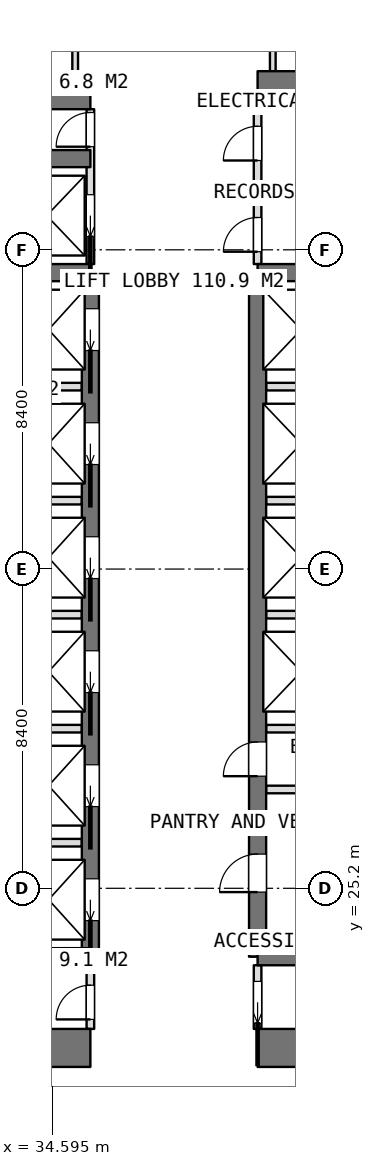
"""IFC4 building model, lengths in metres.
Left out: names, types, materials, properties, quantities, classifications, styles, units other than length and angle.
Written with IfcOpenShell. Run it as: python <this file> out.ifc"""

import sys

from ifc_helpers import new_model, si_unit, direction, frame, frame_2d, origin, place, context, subcontext, project, spatial, rectangle, extrude, element, fill, save


model = new_model("IFC4")
c1 = context("Model", 3, precision=1e-05, world=origin(), true_north=direction((0.0, 1.0)))
c2 = subcontext(c1, "Body", "Model", "MODEL_VIEW")
j1 = project(units=[si_unit("LENGTHUNIT", "METRE"), si_unit("PLANEANGLEUNIT", "RADIAN")], contexts=[c1])
p1 = place(None, origin())
s1 = spatial("IfcSite", under=j1, at=p1, CompositionType="ELEMENT")
p2 = place(p1, origin())
s2 = spatial("IfcBuilding", under=s1, at=p2, CompositionType="ELEMENT")
p3 = place(p2, frame((0.0, 0.0, 110.3)))
s3 = spatial("IfcBuildingStorey", under=s2, at=p3, CompositionType="ELEMENT", Elevation=110.3)
p4 = place(p3, frame((25.2, 21.0, 0.0), z_axis=(0.0, 0.0, 1.0), x_axis=(1.0, 0.0, 0.0)))
e1 = element("IfcWall", 1, at=p4, inside=s3, PredefinedType="SHEAR", context=c2, shape_type="SweptSolid", body=[
    extrude(rectangle(XDim=10.4, YDim=1.0, at=frame_2d((5.2, 0.0))), origin(), (0.0, 0.0, 1.0), 3.75),
])
p5 = place(p3, frame((40.0, 21.0, 0.0), z_axis=(0.0, 0.0, 1.0), x_axis=(1.0, 0.0, 0.0)))
e2 = element("IfcWall", 2, at=p5, inside=s3, PredefinedType="SHEAR", context=c2, shape_type="SweptSolid", body=[
    extrude(rectangle(XDim=10.4, YDim=1.0, at=frame_2d((5.2, 0.0))), origin(), (0.0, 0.0, 1.0), 3.75),
])
p6 = place(p3, frame((25.2, 46.2, 0.0), z_axis=(0.0, 0.0, 1.0), x_axis=(1.0, 0.0, 0.0)))
e3 = element("IfcWall", 3, at=p6, inside=s3, PredefinedType="SHEAR", context=c2, shape_type="SweptSolid", body=[
    extrude(rectangle(XDim=10.4, YDim=1.0, at=frame_2d((5.2, 0.0))), origin(), (0.0, 0.0, 1.0), 3.75),
])
p7 = place(p3, frame((40.0, 46.2, 0.0), z_axis=(0.0, 0.0, 1.0), x_axis=(1.0, 0.0, 0.0)))
e4 = element("IfcWall", 4, at=p7, inside=s3, PredefinedType="SHEAR", context=c2, shape_type="SweptSolid", body=[
    extrude(rectangle(XDim=10.4, YDim=1.0, at=frame_2d((5.2, 0.0))), origin(), (0.0, 0.0, 1.0), 3.75),
])
p8 = place(p3, frame((35.6, 23.4, 0.0), z_axis=(0.0, 0.0, 1.0), x_axis=(0.0, 1.0, 0.0)))
e5 = element("IfcWall", 5, at=p8, inside=s3, PredefinedType="SHEAR", context=c2, shape_type="SweptSolid", body=[
    extrude(rectangle(XDim=18.0, YDim=0.45, at=frame_2d((9.0, 0.0))), origin(), (0.0, 0.0, 1.0), 3.75),
])
p9 = place(p8, frame((0.95, 0.0, 0.0)))
e6 = element("IfcOpeningElement", 6, at=p9, cuts=e5, PredefinedType="OPENING", context=c2, shape_type="SweptSolid", body=[
    extrude(rectangle(XDim=1.1, YDim=2.1, at=frame_2d((0.55, 1.05))), frame((0.0, 0.235, 0.0), z_axis=(0.0, -1.0, 0.0), x_axis=(1.0, 0.0, 0.0)), (0.0, 0.0, 1.0), 0.47),
])
p10 = place(p8, frame((3.95, 0.0, 0.0)))
e7 = element("IfcOpeningElement", 7, at=p10, cuts=e5, PredefinedType="OPENING", context=c2, shape_type="SweptSolid", body=[
    extrude(rectangle(XDim=1.1, YDim=2.1, at=frame_2d((0.55, 1.05))), frame((0.0, 0.235, 0.0), z_axis=(0.0, -1.0, 0.0), x_axis=(1.0, 0.0, 0.0)), (0.0, 0.0, 1.0), 0.47),
])
p11 = place(p8, frame((6.95, 0.0, 0.0)))
e8 = element("IfcOpeningElement", 8, at=p11, cuts=e5, PredefinedType="OPENING", context=c2, shape_type="SweptSolid", body=[
    extrude(rectangle(XDim=1.1, YDim=2.1, at=frame_2d((0.55, 1.05))), frame((0.0, 0.235, 0.0), z_axis=(0.0, -1.0, 0.0), x_axis=(1.0, 0.0, 0.0)), (0.0, 0.0, 1.0), 0.47),
])
p12 = place(p8, frame((9.95, 0.0, 0.0)))
e9 = element("IfcOpeningElement", 9, at=p12, cuts=e5, PredefinedType="OPENING", context=c2, shape_type="SweptSolid", body=[
    extrude(rectangle(XDim=1.1, YDim=2.1, at=frame_2d((0.55, 1.05))), frame((0.0, 0.235, 0.0), z_axis=(0.0, -1.0, 0.0), x_axis=(1.0, 0.0, 0.0)), (0.0, 0.0, 1.0), 0.47),
])
p13 = place(p8, frame((12.95, 0.0, 0.0)))
e10 = element("IfcOpeningElement", 10, at=p13, cuts=e5, PredefinedType="OPENING", context=c2, shape_type="SweptSolid", body=[
    extrude(rectangle(XDim=1.1, YDim=2.1, at=frame_2d((0.55, 1.05))), frame((0.0, 0.235, 0.0), z_axis=(0.0, -1.0, 0.0), x_axis=(1.0, 0.0, 0.0)), (0.0, 0.0, 1.0), 0.47),
])
p14 = place(p8, frame((15.95, 0.0, 0.0)))
e11 = element("IfcOpeningElement", 11, at=p14, cuts=e5, PredefinedType="OPENING", context=c2, shape_type="SweptSolid", body=[
    extrude(rectangle(XDim=1.1, YDim=2.1, at=frame_2d((0.55, 1.05))), frame((0.0, 0.235, 0.0), z_axis=(0.0, -1.0, 0.0), x_axis=(1.0, 0.0, 0.0)), (0.0, 0.0, 1.0), 0.47),
])
p15 = place(p3, frame((40.0, 23.4, 0.0), z_axis=(0.0, 0.0, 1.0), x_axis=(0.0, 1.0, 0.0)))
e12 = element("IfcWall", 12, at=p15, inside=s3, PredefinedType="SHEAR", context=c2, shape_type="SweptSolid", body=[
    extrude(rectangle(XDim=18.0, YDim=0.45, at=frame_2d((9.0, 0.0))), origin(), (0.0, 0.0, 1.0), 3.75),
])
p16 = place(p15, frame((1.7, 0.0, 0.0)))
e13 = element("IfcOpeningElement", 13, at=p16, cuts=e12, PredefinedType="OPENING", context=c2, shape_type="SweptSolid", body=[
    extrude(rectangle(XDim=1.0, YDim=2.1, at=frame_2d((0.5, 1.05))), frame((0.0, 0.235, 0.0), z_axis=(0.0, -1.0, 0.0), x_axis=(1.0, 0.0, 0.0)), (0.0, 0.0, 1.0), 0.47),
])
p17 = place(p15, frame((4.75, 0.0, 0.0)))
e14 = element("IfcOpeningElement", 14, at=p17, cuts=e12, PredefinedType="OPENING", context=c2, shape_type="SweptSolid", body=[
    extrude(rectangle(XDim=0.9, YDim=2.1, at=frame_2d((0.45, 1.05))), frame((0.0, 0.235, 0.0), z_axis=(0.0, -1.0, 0.0), x_axis=(1.0, 0.0, 0.0)), (0.0, 0.0, 1.0), 0.47),
])
for number, where, z_axis, x_axis in (
    (15, (31.8, 23.4, 0.0), (0.0, 0.0, 1.0), (1.0, 0.0, 0.0)),
    (16, (31.8, 41.4, 0.0), (0.0, 0.0, 1.0), (1.0, 0.0, 0.0)),
    (17, (31.8, 44.4, 0.0), (0.0, 0.0, 1.0), (1.0, 0.0, 0.0)),
    (18, (40.0, 23.4, 0.0), (0.0, 0.0, 1.0), (1.0, 0.0, 0.0)),
    (19, (40.0, 41.4, 0.0), (0.0, 0.0, 1.0), (1.0, 0.0, 0.0)),
):
    element("IfcWall", number, at=place(p3, frame(where, z_axis=z_axis, x_axis=x_axis)), inside=s3, PredefinedType="SHEAR", context=c2, shape_type="SweptSolid", body=[
        extrude(rectangle(XDim=3.8, YDim=0.45, at=frame_2d((1.9, 0.0))), origin(), (0.0, 0.0, 1.0), 3.75),
    ])
for number, where, z_axis, x_axis in (
    (20, (32.025, 26.4, 0.0), (0.0, 0.0, 1.0), (1.0, 0.0, 0.0)),
    (21, (32.025, 29.4, 0.0), (0.0, 0.0, 1.0), (1.0, 0.0, 0.0)),
    (22, (32.025, 32.4, 0.0), (0.0, 0.0, 1.0), (1.0, 0.0, 0.0)),
    (23, (32.025, 35.4, 0.0), (0.0, 0.0, 1.0), (1.0, 0.0, 0.0)),
    (24, (32.025, 38.4, 0.0), (0.0, 0.0, 1.0), (1.0, 0.0, 0.0)),
):
    element("IfcWall", number, at=place(p3, frame(where, z_axis=z_axis, x_axis=x_axis)), inside=s3, PredefinedType="PARTITIONING", context=c2, shape_type="SweptSolid", body=[
        extrude(rectangle(XDim=3.35, YDim=0.2, at=frame_2d((1.675, 0.0))), origin(), (0.0, 0.0, 1.0), 3.5),
    ])
for number, where, z_axis, x_axis in (
    (25, (40.225, 29.4, 0.0), (0.0, 0.0, 1.0), (1.0, 0.0, 0.0)),
    (26, (40.225, 32.4, 0.0), (0.0, 0.0, 1.0), (1.0, 0.0, 0.0)),
    (27, (40.225, 35.4, 0.0), (0.0, 0.0, 1.0), (1.0, 0.0, 0.0)),
    (28, (40.225, 38.4, 0.0), (0.0, 0.0, 1.0), (1.0, 0.0, 0.0)),
):
    element("IfcWall", number, at=place(p3, frame(where, z_axis=z_axis, x_axis=x_axis)), inside=s3, PredefinedType="PARTITIONING", context=c2, shape_type="SweptSolid", body=[
        extrude(rectangle(XDim=3.35, YDim=0.2, at=frame_2d((1.675, 0.0))), origin(), (0.0, 0.0, 1.0), 3.5),
    ])
p18 = place(p3, frame((40.0, 21.5, 0.0), z_axis=(0.0, 0.0, 1.0), x_axis=(0.0, 1.0, 0.0)))
e29 = element("IfcWall", 29, at=p18, inside=s3, PredefinedType="PARTITIONING", context=c2, shape_type="SweptSolid", body=[
    extrude(rectangle(XDim=1.675, YDim=0.2, at=frame_2d((0.837, 0.0))), origin(), (0.0, 0.0, 1.0), 3.5),
])
p19 = place(p18, frame((0.15, 0.0, 0.0)))
e30 = element("IfcOpeningElement", 30, at=p19, cuts=e29, PredefinedType="OPENING", context=c2, shape_type="SweptSolid", body=[
    extrude(rectangle(XDim=1.1, YDim=2.1, at=frame_2d((0.55, 1.05))), frame((0.0, 0.11, 0.0), z_axis=(0.0, -1.0, 0.0), x_axis=(1.0, 0.0, 0.0)), (0.0, 0.0, 1.0), 0.22),
])
p20 = place(p3, frame((40.0, 41.625, 0.0), z_axis=(0.0, 0.0, 1.0), x_axis=(0.0, 1.0, 0.0)))
e31 = element("IfcWall", 31, at=p20, inside=s3, PredefinedType="PARTITIONING", context=c2, shape_type="SweptSolid", body=[
    extrude(rectangle(XDim=4.075, YDim=0.2, at=frame_2d((2.038, 0.0))), origin(), (0.0, 0.0, 1.0), 3.5),
])
p21 = place(p20, frame((2.725, 0.0, 0.0)))
e32 = element("IfcOpeningElement", 32, at=p21, cuts=e31, PredefinedType="OPENING", context=c2, shape_type="SweptSolid", body=[
    extrude(rectangle(XDim=0.9, YDim=2.1, at=frame_2d((0.45, 1.05))), frame((0.0, 0.11, 0.0), z_axis=(0.0, -1.0, 0.0), x_axis=(1.0, 0.0, 0.0)), (0.0, 0.0, 1.0), 0.22),
])
p22 = place(p20, frame((0.325, 0.0, 0.0)))
e33 = element("IfcOpeningElement", 33, at=p22, cuts=e31, PredefinedType="OPENING", context=c2, shape_type="SweptSolid", body=[
    extrude(rectangle(XDim=0.9, YDim=2.1, at=frame_2d((0.45, 1.05))), frame((0.0, 0.11, 0.0), z_axis=(0.0, -1.0, 0.0), x_axis=(1.0, 0.0, 0.0)), (0.0, 0.0, 1.0), 0.22),
])
p23 = place(p3, frame((35.6, 41.625, 0.0), z_axis=(0.0, 0.0, 1.0), x_axis=(0.0, 1.0, 0.0)))
e34 = element("IfcWall", 34, at=p23, inside=s3, PredefinedType="PARTITIONING", context=c2, shape_type="SweptSolid", body=[
    extrude(rectangle(XDim=4.075, YDim=0.2, at=frame_2d((2.038, 0.0))), origin(), (0.0, 0.0, 1.0), 3.5),
])
p24 = place(p23, frame((3.088, 0.0, 0.0)))
e35 = element("IfcOpeningElement", 35, at=p24, cuts=e34, PredefinedType="OPENING", context=c2, shape_type="SweptSolid", body=[
    extrude(rectangle(XDim=0.9, YDim=2.1, at=frame_2d((0.45, 1.05))), frame((0.0, 0.11, 0.0), z_axis=(0.0, -1.0, 0.0), x_axis=(1.0, 0.0, 0.0)), (0.0, 0.0, 1.0), 0.22),
])
p25 = place(p23, frame((0.725, 0.0, 0.0)))
e36 = element("IfcOpeningElement", 36, at=p25, cuts=e34, PredefinedType="OPENING", context=c2, shape_type="SweptSolid", body=[
    extrude(rectangle(XDim=1.1, YDim=2.1, at=frame_2d((0.55, 1.05))), frame((0.0, 0.11, 0.0), z_axis=(0.0, -1.0, 0.0), x_axis=(1.0, 0.0, 0.0)), (0.0, 0.0, 1.0), 0.22),
])
p26 = place(p3, frame((35.6, 21.5, 0.0), z_axis=(0.0, 0.0, 1.0), x_axis=(0.0, 1.0, 0.0)))
e37 = element("IfcWall", 37, at=p26, inside=s3, PredefinedType="PARTITIONING", context=c2, shape_type="SweptSolid", body=[
    extrude(rectangle(XDim=1.675, YDim=0.2, at=frame_2d((0.837, 0.0))), origin(), (0.0, 0.0, 1.0), 3.5),
])
p27 = place(p26, frame((0.25, 0.0, 0.0)))
e38 = element("IfcOpeningElement", 38, at=p27, cuts=e37, PredefinedType="OPENING", context=c2, shape_type="SweptSolid", body=[
    extrude(rectangle(XDim=0.9, YDim=2.1, at=frame_2d((0.45, 1.05))), frame((0.0, 0.11, 0.0), z_axis=(0.0, -1.0, 0.0), x_axis=(1.0, 0.0, 0.0)), (0.0, 0.0, 1.0), 0.22),
])
p28 = place(p3, frame((40.225, 27.8, 0.0), z_axis=(0.0, 0.0, 1.0), x_axis=(1.0, 0.0, 0.0)))
e39 = element("IfcWall", 39, at=p28, inside=s3, PredefinedType="PARTITIONING", context=c2, shape_type="SweptSolid", body=[
    extrude(rectangle(XDim=3.35, YDim=0.2, at=frame_2d((1.675, 0.0))), origin(), (0.0, 0.0, 1.0), 3.5),
])
p29 = place(p3, frame((40.0, 43.4, 0.0), z_axis=(0.0, 0.0, 1.0), x_axis=(1.0, 0.0, 0.0)))
e40 = element("IfcWall", 40, at=p29, inside=s3, PredefinedType="PARTITIONING", context=c2, shape_type="SweptSolid", body=[
    extrude(rectangle(XDim=3.575, YDim=0.2, at=frame_2d((1.788, 0.0))), origin(), (0.0, 0.0, 1.0), 3.5),
])
for number, where, z_axis, x_axis in (
    (41, (40.4, 46.7, 0.0), (0.0, 0.0, 1.0), (0.0, 1.0, 0.0)),
    (42, (35.2, 46.7, 0.0), (0.0, 0.0, 1.0), (0.0, 1.0, 0.0)),
):
    element("IfcWall", number, at=place(p3, frame(where, z_axis=z_axis, x_axis=x_axis)), inside=s3, PredefinedType="PARTITIONING", context=c2, shape_type="SweptSolid", body=[
        extrude(rectangle(XDim=2.625, YDim=0.15, at=frame_2d((1.312, 0.0))), origin(), (0.0, 0.0, 1.0), 3.5),
    ])
p30 = place(p19, origin())
e43 = element("IfcDoor", 43, at=p30, inside=s3, OperationType="SLIDING_TO_LEFT", PredefinedType="DOOR", context=c2, shape_type="SweptSolid", body=[
    extrude(rectangle(XDim=1.1, YDim=2.1, at=frame_2d((0.55, 1.05))), frame((0.0, 0.025, 0.0), z_axis=(0.0, -1.0, 0.0), x_axis=(1.0, 0.0, 0.0)), (0.0, 0.0, 1.0), 0.05),
])
fill(e30, e43)
p31 = place(p27, origin())
e44 = element("IfcDoor", 44, at=p31, inside=s3, OperationType="SINGLE_SWING_LEFT", PredefinedType="DOOR", context=c2, shape_type="SweptSolid", body=[
    extrude(rectangle(XDim=0.9, YDim=2.1, at=frame_2d((0.45, 1.05))), frame((0.0, 0.025, 0.0), z_axis=(0.0, -1.0, 0.0), x_axis=(1.0, 0.0, 0.0)), (0.0, 0.0, 1.0), 0.05),
])
fill(e38, e44)
p32 = place(p21, origin())
e45 = element("IfcDoor", 45, at=p32, inside=s3, OperationType="SINGLE_SWING_LEFT", PredefinedType="DOOR", context=c2, shape_type="SweptSolid", body=[
    extrude(rectangle(XDim=0.9, YDim=2.1, at=frame_2d((0.45, 1.05))), frame((0.0, 0.025, 0.0), z_axis=(0.0, -1.0, 0.0), x_axis=(1.0, 0.0, 0.0)), (0.0, 0.0, 1.0), 0.05),
])
fill(e32, e45)
p33 = place(p22, origin())
e46 = element("IfcDoor", 46, at=p33, inside=s3, OperationType="SINGLE_SWING_LEFT", PredefinedType="DOOR", context=c2, shape_type="SweptSolid", body=[
    extrude(rectangle(XDim=0.9, YDim=2.1, at=frame_2d((0.45, 1.05))), frame((0.0, 0.025, 0.0), z_axis=(0.0, -1.0, 0.0), x_axis=(1.0, 0.0, 0.0)), (0.0, 0.0, 1.0), 0.05),
])
fill(e33, e46)
p34 = place(p16, origin())
e47 = element("IfcDoor", 47, at=p34, inside=s3, OperationType="SINGLE_SWING_LEFT", PredefinedType="DOOR", context=c2, shape_type="SweptSolid", body=[
    extrude(rectangle(XDim=1.0, YDim=2.1, at=frame_2d((0.5, 1.05))), frame((0.0, 0.025, 0.0), z_axis=(0.0, -1.0, 0.0), x_axis=(1.0, 0.0, 0.0)), (0.0, 0.0, 1.0), 0.05),
])
fill(e13, e47)
p35 = place(p17, origin())
e48 = element("IfcDoor", 48, at=p35, inside=s3, OperationType="SINGLE_SWING_LEFT", PredefinedType="DOOR", context=c2, shape_type="SweptSolid", body=[
    extrude(rectangle(XDim=0.9, YDim=2.1, at=frame_2d((0.45, 1.05))), frame((0.0, 0.025, 0.0), z_axis=(0.0, -1.0, 0.0), x_axis=(1.0, 0.0, 0.0)), (0.0, 0.0, 1.0), 0.05),
])
fill(e14, e48)
p36 = place(p24, origin())
e49 = element("IfcDoor", 49, at=p36, inside=s3, OperationType="SINGLE_SWING_LEFT", PredefinedType="DOOR", context=c2, shape_type="SweptSolid", body=[
    extrude(rectangle(XDim=0.9, YDim=2.1, at=frame_2d((0.45, 1.05))), frame((0.0, 0.025, 0.0), z_axis=(0.0, -1.0, 0.0), x_axis=(1.0, 0.0, 0.0)), (0.0, 0.0, 1.0), 0.05),
])
fill(e35, e49)
p37 = place(p9, origin())
e50 = element("IfcDoor", 50, at=p37, inside=s3, OperationType="SLIDING_TO_LEFT", PredefinedType="USERDEFINED", context=c2, shape_type="SweptSolid", body=[
    extrude(rectangle(XDim=1.1, YDim=2.1, at=frame_2d((0.55, 1.05))), frame((0.0, 0.025, 0.0), z_axis=(0.0, -1.0, 0.0), x_axis=(1.0, 0.0, 0.0)), (0.0, 0.0, 1.0), 0.05),
])
fill(e6, e50)
p38 = place(p10, origin())
e51 = element("IfcDoor", 51, at=p38, inside=s3, OperationType="SLIDING_TO_LEFT", PredefinedType="USERDEFINED", context=c2, shape_type="SweptSolid", body=[
    extrude(rectangle(XDim=1.1, YDim=2.1, at=frame_2d((0.55, 1.05))), frame((0.0, 0.025, 0.0), z_axis=(0.0, -1.0, 0.0), x_axis=(1.0, 0.0, 0.0)), (0.0, 0.0, 1.0), 0.05),
])
fill(e7, e51)
p39 = place(p11, origin())
e52 = element("IfcDoor", 52, at=p39, inside=s3, OperationType="SLIDING_TO_LEFT", PredefinedType="USERDEFINED", context=c2, shape_type="SweptSolid", body=[
    extrude(rectangle(XDim=1.1, YDim=2.1, at=frame_2d((0.55, 1.05))), frame((0.0, 0.025, 0.0), z_axis=(0.0, -1.0, 0.0), x_axis=(1.0, 0.0, 0.0)), (0.0, 0.0, 1.0), 0.05),
])
fill(e8, e52)
p40 = place(p12, origin())
e53 = element("IfcDoor", 53, at=p40, inside=s3, OperationType="SLIDING_TO_LEFT", PredefinedType="USERDEFINED", context=c2, shape_type="SweptSolid", body=[
    extrude(rectangle(XDim=1.1, YDim=2.1, at=frame_2d((0.55, 1.05))), frame((0.0, 0.025, 0.0), z_axis=(0.0, -1.0, 0.0), x_axis=(1.0, 0.0, 0.0)), (0.0, 0.0, 1.0), 0.05),
])
fill(e9, e53)
p41 = place(p13, origin())
e54 = element("IfcDoor", 54, at=p41, inside=s3, OperationType="SLIDING_TO_LEFT", PredefinedType="USERDEFINED", context=c2, shape_type="SweptSolid", body=[
    extrude(rectangle(XDim=1.1, YDim=2.1, at=frame_2d((0.55, 1.05))), frame((0.0, 0.025, 0.0), z_axis=(0.0, -1.0, 0.0), x_axis=(1.0, 0.0, 0.0)), (0.0, 0.0, 1.0), 0.05),
])
fill(e10, e54)
p42 = place(p14, origin())
e55 = element("IfcDoor", 55, at=p42, inside=s3, OperationType="SLIDING_TO_LEFT", PredefinedType="USERDEFINED", context=c2, shape_type="SweptSolid", body=[
    extrude(rectangle(XDim=1.1, YDim=2.1, at=frame_2d((0.55, 1.05))), frame((0.0, 0.025, 0.0), z_axis=(0.0, -1.0, 0.0), x_axis=(1.0, 0.0, 0.0)), (0.0, 0.0, 1.0), 0.05),
])
fill(e11, e55)
p43 = place(p25, origin())
e56 = element("IfcDoor", 56, at=p43, inside=s3, OperationType="SLIDING_TO_LEFT", PredefinedType="USERDEFINED", context=c2, shape_type="SweptSolid", body=[
    extrude(rectangle(XDim=1.1, YDim=2.1, at=frame_2d((0.55, 1.05))), frame((0.0, 0.025, 0.0), z_axis=(0.0, -1.0, 0.0), x_axis=(1.0, 0.0, 0.0)), (0.0, 0.0, 1.0), 0.05),
])
fill(e36, e56)
save(model, sys.argv[1])
